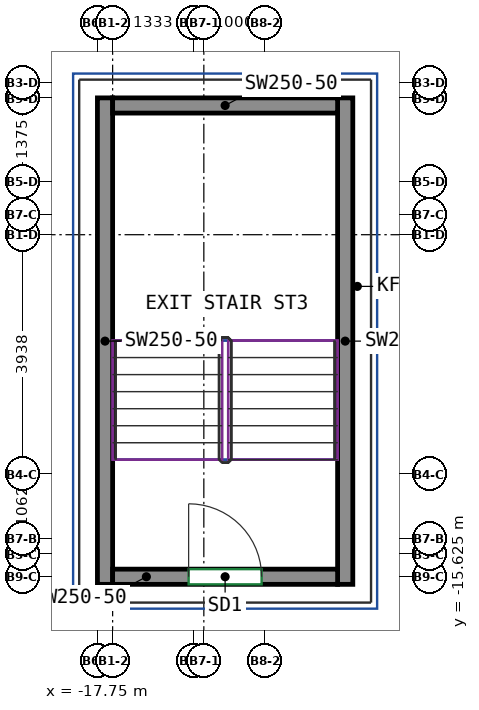
"""IFC4 building model, lengths in metres.
Left out: names, types, materials, properties, quantities, classifications, styles, units other than length and angle.
Written with IfcOpenShell. Run it as: python <this file> out.ifc"""

import sys

from ifc_helpers import new_model, si_unit, direction, frame, frame_2d, origin, place, context, subcontext, project, spatial, rectangle, extrude, source, transform, mapped, element, fill, save


model = new_model("IFC4")
c1 = context("Model", 3, precision=1e-05, world=origin(), true_north=direction((0.0, 1.0)))
c2 = subcontext(c1, "Body", "Model", "MODEL_VIEW")
j1 = project(units=[si_unit("LENGTHUNIT", "METRE"), si_unit("PLANEANGLEUNIT", "RADIAN")], contexts=[c1])
p1 = place(None, origin())
s1 = spatial("IfcSite", under=j1, at=p1, CompositionType="ELEMENT")
p2 = place(p1, origin())
s2 = spatial("IfcBuilding", under=s1, at=p2, CompositionType="ELEMENT")
p3 = place(p2, frame((0.0, 0.0, 323.8)))
s3 = spatial("IfcBuildingStorey", under=s2, at=p3, CompositionType="ELEMENT", Elevation=323.8)
m1 = source(origin(), c2, "Body", "SweptSolid", [
    extrude(rectangle(XDim=8.0, YDim=0.25, at=frame_2d((4.0, 0.0))), origin(), (0.0, 0.0, 1.0), 5.0),
])
for number, where, z_axis, x_axis in (
    (1, (-17.625, -15.75, -0.4), (0.0, 0.0, 1.0), (0.0, 1.0, 0.0)),
    (2, (-13.675, -15.75, -0.4), (0.0, 0.0, 1.0), (0.0, 1.0, 0.0)),
):
    element("IfcWall", number, at=place(p3, frame(where, z_axis=z_axis, x_axis=x_axis)), inside=s3, PredefinedType="SHEAR", context=c2, shape_type="MappedRepresentation", body=[
        mapped(m1, transform((0.0, 0.0, 0.0))),
    ])
m2 = source(origin(), c2, "Body", "SweptSolid", [
    extrude(rectangle(XDim=3.7, YDim=0.25, at=frame_2d((1.85, 0.0))), origin(), (0.0, 0.0, 1.0), 5.0),
])
p4 = place(p3, frame((-17.5, -15.625, -0.4), z_axis=(0.0, 0.0, 1.0), x_axis=(1.0, 0.0, 0.0)))
e3 = element("IfcWall", 3, at=p4, inside=s3, PredefinedType="SHEAR", context=c2, shape_type="MappedRepresentation", body=[
    mapped(m2, transform((0.0, 0.0, 0.0))),
])
p5 = place(p4, frame((1.25, 0.0, 0.4)))
e4 = element("IfcOpeningElement", 4, at=p5, cuts=e3, PredefinedType="OPENING", context=c2, shape_type="SweptSolid", body=[
    extrude(rectangle(XDim=1.2, YDim=2.1, at=frame_2d((0.6, 1.05))), frame((0.0, 0.135, 0.0), z_axis=(0.0, -1.0, 0.0), x_axis=(1.0, 0.0, 0.0)), (0.0, 0.0, 1.0), 0.27),
])
p6 = place(p3, frame((-17.5, -7.875, -0.4), z_axis=(0.0, 0.0, 1.0), x_axis=(1.0, 0.0, 0.0)))
e5 = element("IfcWall", 5, at=p6, inside=s3, PredefinedType="SHEAR", context=c2, shape_type="MappedRepresentation", body=[
    mapped(m2, transform((0.0, 0.0, 0.0))),
])
p7 = place(p5, origin())
e6 = element("IfcDoor", 6, at=p7, inside=s3, OperationType="DOUBLE_DOOR_SINGLE_SWING", PredefinedType="DOOR", context=c2, shape_type="SweptSolid", body=[
    extrude(rectangle(XDim=1.2, YDim=2.1, at=frame_2d((0.6, 1.05))), frame((0.0, 0.025, 0.0), z_axis=(0.0, -1.0, 0.0), x_axis=(1.0, 0.0, 0.0)), (0.0, 0.0, 1.0), 0.05),
])
fill(e4, e6)
save(model, sys.argv[1])
